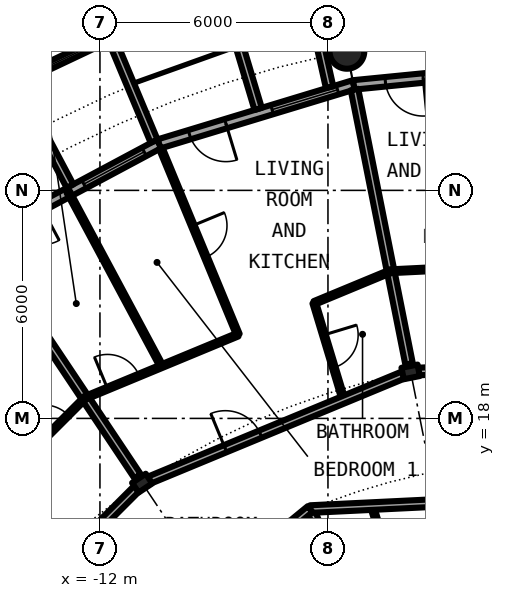
"""IFC4 building model, lengths in metres.
Left out: names, types, materials, properties, quantities, classifications, styles, units other than length and angle.
Written with IfcOpenShell. Run it as: python <this file> out.ifc"""

import sys

from ifc_helpers import new_model, si_unit, direction, frame, frame_2d, origin, origin_2d, place, context, subcontext, project, spatial, rectangle, circle, hollow_circle, i_section, extrude, element, fill, save


model = new_model("IFC4")
c1 = context("Model", 3, precision=1e-05, world=origin(), true_north=direction((0.0, 1.0)))
c2 = subcontext(c1, "Body", "Model", "MODEL_VIEW")
j1 = project(units=[si_unit("LENGTHUNIT", "METRE"), si_unit("PLANEANGLEUNIT", "RADIAN")], contexts=[c1])
p1 = place(None, origin())
s1 = spatial("IfcSite", under=j1, at=p1, CompositionType="ELEMENT")
p2 = place(p1, origin())
s2 = spatial("IfcBuilding", under=s1, at=p2, CompositionType="ELEMENT")
p3 = place(p2, frame((0.0, 0.0, 111.65)))
s3 = spatial("IfcBuildingStorey", under=s2, at=p3, CompositionType="ELEMENT", Elevation=111.65)
p4 = place(p3, frame((-5.501, 27.658, 0.0), z_axis=(0.0, 0.0, 1.0), x_axis=(1.0, 0.0, 0.0)))
e1 = element("IfcColumn", 1, at=p4, inside=s3, PredefinedType="COLUMN", context=c2, shape_type="SweptSolid", body=[
    extrude(hollow_circle(Radius=0.457, WallThickness=0.04, at=origin_2d()), origin(), (0.0, 0.0, 1.0), 3.05),
])
for number, where, z_axis, x_axis in (
    (2, (-3.824, 19.223, 0.0), (0.0, 0.0, 1.0), (-0.195, 0.981, 0.0)),
    (3, (-10.889, 16.297, 0.0), (0.0, 0.0, 1.0), (-0.556, 0.831, 0.0)),
):
    element("IfcColumn", number, at=place(p3, frame(where, z_axis=z_axis, x_axis=x_axis)), inside=s3, PredefinedType="COLUMN", context=c2, shape_type="SweptSolid", body=[
        extrude(i_section(OverallWidth=0.307, OverallDepth=0.432, WebThickness=0.021, FlangeThickness=0.04, FilletRadius=0.027, at=origin_2d()), origin(), (0.0, 0.0, 1.0), 3.05),
    ])
p5 = place(p3, frame((0.0, 27.3, 0.0), z_axis=(0.0, 0.0, 1.0), x_axis=(-0.995173996315, -0.098126026407, 0.0)))
e4 = element("IfcWall", 4, at=p5, inside=s3, PredefinedType="SOLIDWALL", context=c2, shape_type="SweptSolid", body=[
    extrude(rectangle(XDim=5.352, YDim=0.25, at=frame_2d((2.676, 0.0))), origin(), (0.0, 0.0, 1.0), 2.7),
])
p6 = place(p5, frame((0.441, 0.0, 0.3)))
e5 = element("IfcOpeningElement", 5, at=p6, cuts=e4, PredefinedType="OPENING", context=c2, shape_type="SweptSolid", body=[
    extrude(rectangle(XDim=1.8, YDim=2.1, at=frame_2d((0.9, 1.05))), frame((0.0, 0.135, 0.0), z_axis=(0.0, -1.0, 0.0), x_axis=(1.0, 0.0, 0.0)), (0.0, 0.0, 1.0), 0.27),
])
p7 = place(p5, frame((3.51, 0.0, 0.0)))
e6 = element("IfcOpeningElement", 6, at=p7, cuts=e4, PredefinedType="OPENING", context=c2, shape_type="SweptSolid", body=[
    extrude(rectangle(XDim=1.0, YDim=2.2, at=frame_2d((0.5, 1.1))), frame((0.0, 0.135, 0.0), z_axis=(0.0, -1.0, 0.0), x_axis=(1.0, 0.0, 0.0)), (0.0, 0.0, 1.0), 0.27),
])
p8 = place(p3, frame((-5.326, 26.775, 0.0), z_axis=(0.0, 0.0, 1.0), x_axis=(-0.956965678721, -0.290201119486, 0.0)))
e7 = element("IfcWall", 7, at=p8, inside=s3, PredefinedType="SOLIDWALL", context=c2, shape_type="SweptSolid", body=[
    extrude(rectangle(XDim=5.351, YDim=0.25, at=frame_2d((2.676, 0.0))), origin(), (0.0, 0.0, 1.0), 2.7),
])
p9 = place(p8, frame((0.441, 0.0, 0.3)))
e8 = element("IfcOpeningElement", 8, at=p9, cuts=e7, PredefinedType="OPENING", context=c2, shape_type="SweptSolid", body=[
    extrude(rectangle(XDim=1.8, YDim=2.1, at=frame_2d((0.9, 1.05))), frame((0.0, 0.135, 0.0), z_axis=(0.0, -1.0, 0.0), x_axis=(1.0, 0.0, 0.0)), (0.0, 0.0, 1.0), 0.27),
])
p10 = place(p8, frame((3.51, 0.0, 0.0)))
e9 = element("IfcOpeningElement", 9, at=p10, cuts=e7, PredefinedType="OPENING", context=c2, shape_type="SweptSolid", body=[
    extrude(rectangle(XDim=1.0, YDim=2.2, at=frame_2d((0.5, 1.1))), frame((0.0, 0.135, 0.0), z_axis=(0.0, -1.0, 0.0), x_axis=(1.0, 0.0, 0.0)), (0.0, 0.0, 1.0), 0.27),
])
p11 = place(p3, frame((-5.957, 26.715, -0.03), z_axis=(0.0, 0.0, 1.0), x_axis=(-0.217857287091, 0.975980636315, 0.0)))
e10 = element("IfcWall", 10, at=p11, inside=s3, PredefinedType="SOLIDWALL", context=c2, shape_type="SweptSolid", body=[
    extrude(rectangle(XDim=2.928, YDim=0.2, at=frame_2d((1.464, 0.0))), origin(), (0.0, 0.0, 1.0), 2.73),
])
p12 = place(p3, frame((-7.837, 26.144, -0.03), z_axis=(0.0, 0.0, 1.0), x_axis=(-0.287064767992, 0.957911174889, 0.0)))
e11 = element("IfcWall", 11, at=p12, inside=s3, PredefinedType="SOLIDWALL", context=c2, shape_type="SweptSolid", body=[
    extrude(rectangle(XDim=3.006, YDim=0.2, at=frame_2d((1.503, 0.0))), origin(), (0.0, 0.0, 1.0), 2.73),
])
p13 = place(p3, frame((-10.447, 25.222, 0.0), z_axis=(0.0, 0.0, 1.0), x_axis=(-0.881915646801, -0.471407246368, 0.0)))
e12 = element("IfcWall", 12, at=p13, inside=s3, PredefinedType="SOLIDWALL", context=c2, shape_type="SweptSolid", body=[
    extrude(rectangle(XDim=5.352, YDim=0.25, at=frame_2d((2.676, 0.0))), origin(), (0.0, 0.0, 1.0), 2.7),
])
p14 = place(p13, frame((0.441, 0.0, 0.3)))
e13 = element("IfcOpeningElement", 13, at=p14, cuts=e12, PredefinedType="OPENING", context=c2, shape_type="SweptSolid", body=[
    extrude(rectangle(XDim=1.8, YDim=2.1, at=frame_2d((0.9, 1.05))), frame((0.0, 0.135, 0.0), z_axis=(0.0, -1.0, 0.0), x_axis=(1.0, 0.0, 0.0)), (0.0, 0.0, 1.0), 0.27),
])
p15 = place(p13, frame((3.51, 0.0, 0.0)))
e14 = element("IfcOpeningElement", 14, at=p15, cuts=e12, PredefinedType="OPENING", context=c2, shape_type="SweptSolid", body=[
    extrude(rectangle(XDim=1.0, YDim=2.2, at=frame_2d((0.5, 1.1))), frame((0.0, 0.135, 0.0), z_axis=(0.0, -1.0, 0.0), x_axis=(1.0, 0.0, 0.0)), (0.0, 0.0, 1.0), 0.27),
])
p16 = place(p3, frame((-11.629, 28.088, -0.03), z_axis=(0.0, 0.0, 1.0), x_axis=(-0.904000060331, -0.427532327342, 0.0)))
e15 = element("IfcWall", 15, at=p16, inside=s3, PredefinedType="SOLIDWALL", context=c2, shape_type="SweptSolid", body=[
    extrude(rectangle(XDim=2.993, YDim=0.2, at=frame_2d((1.497, 0.0))), origin(), (0.0, 0.0, 1.0), 2.73),
])
p17 = place(p16, frame((0.457, 0.0, 0.33)))
e16 = element("IfcOpeningElement", 16, at=p17, cuts=e15, PredefinedType="OPENING", context=c2, shape_type="SweptSolid", body=[
    extrude(circle(Radius=1.04, at=frame_2d((1.04, 1.04))), frame((0.0, 0.11, 0.0), z_axis=(0.0, -1.0, 0.0), x_axis=(1.0, 0.0, 0.0)), (0.0, 0.0, 1.0), 0.22),
])
p18 = place(p3, frame((-10.575, 25.295, -0.03), z_axis=(0.0, 0.0, 1.0), x_axis=(-0.385697364644, 0.922625353492, 0.0)))
e17 = element("IfcWall", 17, at=p18, inside=s3, PredefinedType="SOLIDWALL", context=c2, shape_type="SweptSolid", body=[
    extrude(rectangle(XDim=2.883, YDim=0.2, at=frame_2d((1.442, 0.0))), origin(), (0.0, 0.0, 1.0), 2.73),
])
p19 = place(p3, frame((-12.787, 24.113, -0.03), z_axis=(0.0, 0.0, 1.0), x_axis=(-0.468365282436, 0.883534924159, 0.0)))
e18 = element("IfcWall", 18, at=p19, inside=s3, PredefinedType="SOLIDWALL", context=c2, shape_type="SweptSolid", body=[
    extrude(rectangle(XDim=3.006, YDim=0.2, at=frame_2d((1.503, 0.0))), origin(), (0.0, 0.0, 1.0), 2.73),
])
p20 = place(p3, frame((-15.097, 22.595, 0.0), z_axis=(0.0, 0.0, 1.0), x_axis=(0.555572791, -0.831467903109, 0.0)))
e19 = element("IfcWall", 19, at=p20, inside=s3, PredefinedType="PARTITIONING", context=c2, shape_type="SweptSolid", body=[
    extrude(rectangle(XDim=7.358, YDim=0.2, at=frame_2d((3.679, 0.0))), origin(), (0.0, 0.0, 1.0), 2.7),
])
p21 = place(p3, frame((-12.833, 23.954, 0.0), z_axis=(0.0, 0.0, 1.0), x_axis=(0.472148388886, -0.881519085938, 0.0)))
e20 = element("IfcWall", 20, at=p21, inside=s3, PredefinedType="PARTITIONING", context=c2, shape_type="SweptSolid", body=[
    extrude(rectangle(XDim=5.196, YDim=0.1, at=frame_2d((2.598, 0.0))), origin(), (0.0, 0.0, 1.0), 2.7),
])
p22 = place(p3, frame((-10.399, 25.106, 0.0), z_axis=(0.0, 0.0, 1.0), x_axis=(0.382620183578, -0.92390572848, 0.0)))
e21 = element("IfcWall", 21, at=p22, inside=s3, PredefinedType="PARTITIONING", context=c2, shape_type="SweptSolid", body=[
    extrude(rectangle(XDim=5.302, YDim=0.1, at=frame_2d((2.651, 0.0))), origin(), (0.0, 0.0, 1.0), 2.7),
])
p23 = place(p22, frame((2.201, 0.0, 0.0)))
e22 = element("IfcOpeningElement", 22, at=p23, cuts=e21, PredefinedType="OPENING", context=c2, shape_type="SweptSolid", body=[
    extrude(rectangle(XDim=0.9, YDim=2.3, at=frame_2d((0.45, 1.15))), frame((0.0, 0.06, 0.0), z_axis=(0.0, -1.0, 0.0), x_axis=(1.0, 0.0, 0.0)), (0.0, 0.0, 1.0), 0.12),
])
p24 = place(p3, frame((-6.468, 15.614, 0.0), z_axis=(0.0, 0.0, 1.0), x_axis=(0.382646942224, -0.923894646378, 0.0)))
e23 = element("IfcWall", 23, at=p24, inside=s3, PredefinedType="PARTITIONING", context=c2, shape_type="SweptSolid", body=[
    extrude(rectangle(XDim=9.181, YDim=0.2, at=frame_2d((4.59, 0.0))), origin(), (0.0, 0.0, 1.0), 2.7),
])
p25 = place(p3, frame((-6.36, 21.039, 0.0), z_axis=(0.0, 0.0, 1.0), x_axis=(0.289375816213, -0.957215564537, 0.0)))
e24 = element("IfcWall", 24, at=p25, inside=s3, PredefinedType="PARTITIONING", context=c2, shape_type="SweptSolid", body=[
    extrude(rectangle(XDim=2.661, YDim=0.1, at=frame_2d((1.331, 0.0))), origin(), (0.0, 0.0, 1.0), 2.7),
])
p26 = place(p25, frame((0.88, 0.0, 0.0)))
e25 = element("IfcOpeningElement", 25, at=p26, cuts=e24, PredefinedType="OPENING", context=c2, shape_type="SweptSolid", body=[
    extrude(rectangle(XDim=0.9, YDim=2.3, at=frame_2d((0.45, 1.15))), frame((0.0, 0.06, 0.0), z_axis=(0.0, -1.0, 0.0), x_axis=(1.0, 0.0, 0.0)), (0.0, 0.0, 1.0), 0.12),
])
p27 = place(p3, frame((-5.302, 26.653, 0.0), z_axis=(0.0, 0.0, 1.0), x_axis=(0.195127206499, -0.980777942902, 0.0)))
e26 = element("IfcWall", 26, at=p27, inside=s3, PredefinedType="PARTITIONING", context=c2, shape_type="SweptSolid", body=[
    extrude(rectangle(XDim=7.359, YDim=0.2, at=frame_2d((3.68, 0.0))), origin(), (0.0, 0.0, 1.0), 2.7),
])
p28 = place(p3, frame((-4.843, 15.693, 0.0), z_axis=(0.0, 0.0, 1.0), x_axis=(0.294961884541, -0.955509019669, 0.0)))
e27 = element("IfcWall", 27, at=p28, inside=s3, PredefinedType="PARTITIONING", context=c2, shape_type="SweptSolid", body=[
    extrude(rectangle(XDim=2.624, YDim=0.1, at=frame_2d((1.312, 0.0))), origin(), (0.0, 0.0, 1.0), 2.7),
])
p29 = place(p28, frame((0.862, 0.0, 0.0)))
e28 = element("IfcOpeningElement", 28, at=p29, cuts=e27, PredefinedType="OPENING", context=c2, shape_type="SweptSolid", body=[
    extrude(rectangle(XDim=0.9, YDim=2.3, at=frame_2d((0.45, 1.15))), frame((0.0, 0.06, 0.0), z_axis=(0.0, -1.0, 0.0), x_axis=(1.0, 0.0, 0.0)), (0.0, 0.0, 1.0), 0.12),
])
p30 = place(p3, frame((-6.467, 15.614, 0.0), z_axis=(0.0, 0.0, 1.0), x_axis=(0.998821060576, 0.048543680847, 0.0)))
e29 = element("IfcWall", 29, at=p30, inside=s3, PredefinedType="PARTITIONING", context=c2, shape_type="SweptSolid", body=[
    extrude(rectangle(XDim=11.391, YDim=0.2, at=frame_2d((5.696, 0.0))), origin(), (0.0, 0.0, 1.0), 2.7),
])
p31 = place(p30, frame((6.007, 0.0, 0.0)))
e30 = element("IfcOpeningElement", 30, at=p31, cuts=e29, PredefinedType="OPENING", context=c2, shape_type="SweptSolid", body=[
    extrude(rectangle(XDim=1.0, YDim=2.3, at=frame_2d((0.5, 1.15))), frame((0.0, 0.11, 0.0), z_axis=(0.0, -1.0, 0.0), x_axis=(1.0, 0.0, 0.0)), (0.0, 0.0, 1.0), 0.22),
])
p32 = place(p3, frame((-14.052, 9.389, 0.0), z_axis=(0.0, 0.0, 1.0), x_axis=(0.77292501819, 0.634497372931, 0.0)))
e31 = element("IfcWall", 31, at=p32, inside=s3, PredefinedType="PARTITIONING", context=c2, shape_type="SweptSolid", body=[
    extrude(rectangle(XDim=9.81, YDim=0.2, at=frame_2d((4.905, 0.0))), origin(), (0.0, 0.0, 1.0), 2.7),
])
p33 = place(p32, frame((4.406, 0.0, 0.0)))
e32 = element("IfcOpeningElement", 32, at=p33, cuts=e31, PredefinedType="OPENING", context=c2, shape_type="SweptSolid", body=[
    extrude(rectangle(XDim=1.0, YDim=2.3, at=frame_2d((0.5, 1.15))), frame((0.0, 0.11, 0.0), z_axis=(0.0, -1.0, 0.0), x_axis=(1.0, 0.0, 0.0)), (0.0, 0.0, 1.0), 0.22),
])
p34 = place(p3, frame((-16.186, 11.0, 0.0), z_axis=(0.0, 0.0, 1.0), x_axis=(0.707106781187, 0.707106781187, 0.0)))
e33 = element("IfcWall", 33, at=p34, inside=s3, PredefinedType="PARTITIONING", context=c2, shape_type="SweptSolid", body=[
    extrude(rectangle(XDim=7.334, YDim=0.2, at=frame_2d((3.667, 0.0))), origin(), (0.0, 0.0, 1.0), 2.39),
])
p35 = place(p34, frame((4.123, 0.0, 0.0)))
e34 = element("IfcOpeningElement", 34, at=p35, cuts=e33, PredefinedType="OPENING", context=c2, shape_type="SweptSolid", body=[
    extrude(rectangle(XDim=1.0, YDim=2.3, at=frame_2d((0.5, 1.15))), frame((0.0, 0.11, 0.0), z_axis=(0.0, -1.0, 0.0), x_axis=(1.0, 0.0, 0.0)), (0.0, 0.0, 1.0), 0.22),
])
p36 = place(p3, frame((-10.745, 16.357, 0.0), z_axis=(0.0, 0.0, 1.0), x_axis=(0.923928411035, 0.382565407848, 0.0)))
e35 = element("IfcWall", 35, at=p36, inside=s3, PredefinedType="PARTITIONING", context=c2, shape_type="SweptSolid", body=[
    extrude(rectangle(XDim=7.335, YDim=0.2, at=frame_2d((3.667, 0.0))), origin(), (0.0, 0.0, 1.0), 2.39),
])
p37 = place(p36, frame((2.212, 0.0, 0.0)))
e36 = element("IfcOpeningElement", 36, at=p37, cuts=e35, PredefinedType="OPENING", context=c2, shape_type="SweptSolid", body=[
    extrude(rectangle(XDim=1.0, YDim=2.3, at=frame_2d((0.5, 1.15))), frame((0.0, 0.11, 0.0), z_axis=(0.0, -1.0, 0.0), x_axis=(1.0, 0.0, 0.0)), (0.0, 0.0, 1.0), 0.22),
])
p38 = place(p3, frame((-3.669, 19.231, 0.0), z_axis=(0.0, 0.0, 1.0), x_axis=(0.998803644396, 0.048900715146, 0.0)))
e37 = element("IfcWall", 37, at=p38, inside=s3, PredefinedType="PARTITIONING", context=c2, shape_type="SweptSolid", body=[
    extrude(rectangle(XDim=5.602, YDim=0.2, at=frame_2d((2.801, 0.0))), origin(), (0.0, 0.0, 1.0), 2.39),
])
p39 = place(p38, frame((3.179, 0.0, 0.0)))
e38 = element("IfcOpeningElement", 38, at=p39, cuts=e37, PredefinedType="OPENING", context=c2, shape_type="SweptSolid", body=[
    extrude(rectangle(XDim=1.0, YDim=2.3, at=frame_2d((0.5, 1.15))), frame((0.0, 0.11, 0.0), z_axis=(0.0, -1.0, 0.0), x_axis=(1.0, 0.0, 0.0)), (0.0, 0.0, 1.0), 0.22),
])
p40 = place(p3, frame((-15.465, 15.465, 0.0), z_axis=(0.0, 0.0, 1.0), x_axis=(0.707022606819, 0.707190945535, 0.0)))
e39 = element("IfcWall", 39, at=p40, inside=s3, PredefinedType="PARTITIONING", context=c2, shape_type="SweptSolid", body=[
    extrude(rectangle(XDim=4.351, YDim=0.1, at=frame_2d((2.175, 0.0))), origin(), (0.0, 0.0, 1.0), 2.7),
])
p41 = place(p40, frame((2.813, 0.0, 0.0)))
e40 = element("IfcOpeningElement", 40, at=p41, cuts=e39, PredefinedType="OPENING", context=c2, shape_type="SweptSolid", body=[
    extrude(rectangle(XDim=0.9, YDim=2.3, at=frame_2d((0.45, 1.15))), frame((0.0, 0.06, 0.0), z_axis=(0.0, -1.0, 0.0), x_axis=(1.0, 0.0, 0.0)), (0.0, 0.0, 1.0), 0.12),
])
p42 = place(p3, frame((-12.397, 18.536, 0.0), z_axis=(0.0, 0.0, 1.0), x_axis=(0.923761942059, 0.382967197554, 0.0)))
e41 = element("IfcWall", 41, at=p42, inside=s3, PredefinedType="PARTITIONING", context=c2, shape_type="SweptSolid", body=[
    extrude(rectangle(XDim=4.356, YDim=0.1, at=frame_2d((2.178, 0.0))), origin(), (0.0, 0.0, 1.0), 2.7),
])
p43 = place(p42, frame((0.646, 0.0, 0.0)))
e42 = element("IfcOpeningElement", 42, at=p43, cuts=e41, PredefinedType="OPENING", context=c2, shape_type="SweptSolid", body=[
    extrude(rectangle(XDim=0.9, YDim=2.3, at=frame_2d((0.45, 1.15))), frame((0.0, 0.06, 0.0), z_axis=(0.0, -1.0, 0.0), x_axis=(1.0, 0.0, 0.0)), (0.0, 0.0, 1.0), 0.12),
])
p44 = place(p3, frame((-6.36, 21.039, 0.0), z_axis=(0.0, 0.0, 1.0), x_axis=(0.923743082263, 0.383012686436, 0.0)))
e43 = element("IfcWall", 43, at=p44, inside=s3, PredefinedType="PARTITIONING", context=c2, shape_type="SweptSolid", body=[
    extrude(rectangle(XDim=2.175, YDim=0.1, at=frame_2d((1.087, 0.0))), origin(), (0.0, 0.0, 1.0), 2.7),
])
p45 = place(p3, frame((-4.351, 21.872, 0.0), z_axis=(0.0, 0.0, 1.0), x_axis=(0.998797962079, 0.049016639484, 0.0)))
e44 = element("IfcWall", 44, at=p45, inside=s3, PredefinedType="PARTITIONING", context=c2, shape_type="SweptSolid", body=[
    extrude(rectangle(XDim=2.182, YDim=0.1, at=frame_2d((1.091, 0.0))), origin(), (0.0, 0.0, 1.0), 2.7),
])
p46 = place(p7, origin())
e45 = element("IfcDoor", 45, at=p46, inside=s3, OperationType="SINGLE_SWING_LEFT", PredefinedType="DOOR", context=c2, shape_type="SweptSolid", body=[
    extrude(rectangle(XDim=1.0, YDim=2.2, at=frame_2d((0.5, 1.1))), frame((0.0, 0.025, 0.0), z_axis=(0.0, -1.0, 0.0), x_axis=(1.0, 0.0, 0.0)), (0.0, 0.0, 1.0), 0.05),
])
fill(e6, e45)
p47 = place(p9, origin())
e46 = element("IfcWindow", 46, at=p47, inside=s3, PartitioningType="SINGLE_PANEL", PredefinedType="WINDOW", context=c2, shape_type="SweptSolid", body=[
    extrude(rectangle(XDim=1.8, YDim=2.1, at=frame_2d((0.9, 1.05))), frame((0.0, 0.03, 0.0), z_axis=(0.0, -1.0, 0.0), x_axis=(1.0, 0.0, 0.0)), (0.0, 0.0, 1.0), 0.06),
])
fill(e8, e46)
p48 = place(p10, origin())
e47 = element("IfcDoor", 47, at=p48, inside=s3, OperationType="SINGLE_SWING_LEFT", PredefinedType="DOOR", context=c2, shape_type="SweptSolid", body=[
    extrude(rectangle(XDim=1.0, YDim=2.2, at=frame_2d((0.5, 1.1))), frame((0.0, 0.025, 0.0), z_axis=(0.0, -1.0, 0.0), x_axis=(1.0, 0.0, 0.0)), (0.0, 0.0, 1.0), 0.05),
])
fill(e9, e47)
p49 = place(p14, origin())
e48 = element("IfcWindow", 48, at=p49, inside=s3, PartitioningType="SINGLE_PANEL", PredefinedType="WINDOW", context=c2, shape_type="SweptSolid", body=[
    extrude(rectangle(XDim=1.8, YDim=2.1, at=frame_2d((0.9, 1.05))), frame((0.0, 0.03, 0.0), z_axis=(0.0, -1.0, 0.0), x_axis=(1.0, 0.0, 0.0)), (0.0, 0.0, 1.0), 0.06),
])
fill(e13, e48)
p50 = place(p17, origin())
e49 = element("IfcWindow", 49, at=p50, inside=s3, PartitioningType="SINGLE_PANEL", PredefinedType="WINDOW", context=c2, shape_type="SweptSolid", body=[
    extrude(circle(Radius=1.04, at=frame_2d((1.04, 1.04))), frame((0.0, 0.03, 0.0), z_axis=(0.0, -1.0, 0.0), x_axis=(1.0, 0.0, 0.0)), (0.0, 0.0, 1.0), 0.06),
])
fill(e16, e49)
p51 = place(p37, origin())
e50 = element("IfcDoor", 50, at=p51, inside=s3, OperationType="SINGLE_SWING_LEFT", PredefinedType="DOOR", context=c2, shape_type="SweptSolid", body=[
    extrude(rectangle(XDim=1.0, YDim=2.3, at=frame_2d((0.5, 1.15))), frame((0.0, 0.025, 0.0), z_axis=(0.0, -1.0, 0.0), x_axis=(1.0, 0.0, 0.0)), (0.0, 0.0, 1.0), 0.05),
])
fill(e36, e50)
p52 = place(p26, origin())
e51 = element("IfcDoor", 51, at=p52, inside=s3, OperationType="SINGLE_SWING_LEFT", PredefinedType="DOOR", context=c2, shape_type="SweptSolid", body=[
    extrude(rectangle(XDim=0.9, YDim=2.3, at=frame_2d((0.45, 1.15))), frame((0.0, 0.025, 0.0), z_axis=(0.0, -1.0, 0.0), x_axis=(1.0, 0.0, 0.0)), (0.0, 0.0, 1.0), 0.05),
])
fill(e25, e51)
p53 = place(p23, origin())
e52 = element("IfcDoor", 52, at=p53, inside=s3, OperationType="SINGLE_SWING_LEFT", PredefinedType="DOOR", context=c2, shape_type="SweptSolid", body=[
    extrude(rectangle(XDim=0.9, YDim=2.3, at=frame_2d((0.45, 1.15))), frame((0.0, 0.025, 0.0), z_axis=(0.0, -1.0, 0.0), x_axis=(1.0, 0.0, 0.0)), (0.0, 0.0, 1.0), 0.05),
])
fill(e22, e52)
p54 = place(p43, origin())
e53 = element("IfcDoor", 53, at=p54, inside=s3, OperationType="SINGLE_SWING_LEFT", PredefinedType="DOOR", context=c2, shape_type="SweptSolid", body=[
    extrude(rectangle(XDim=0.9, YDim=2.3, at=frame_2d((0.45, 1.15))), frame((0.0, 0.025, 0.0), z_axis=(0.0, -1.0, 0.0), x_axis=(1.0, 0.0, 0.0)), (0.0, 0.0, 1.0), 0.05),
])
fill(e42, e53)
p55 = place(p41, origin())
e54 = element("IfcDoor", 54, at=p55, inside=s3, OperationType="SINGLE_SWING_RIGHT", PredefinedType="DOOR", context=c2, shape_type="SweptSolid", body=[
    extrude(rectangle(XDim=0.9, YDim=2.3, at=frame_2d((0.45, 1.15))), frame((0.0, 0.025, 0.0), z_axis=(0.0, -1.0, 0.0), x_axis=(1.0, 0.0, 0.0)), (0.0, 0.0, 1.0), 0.05),
])
fill(e40, e54)
save(model, sys.argv[1])
